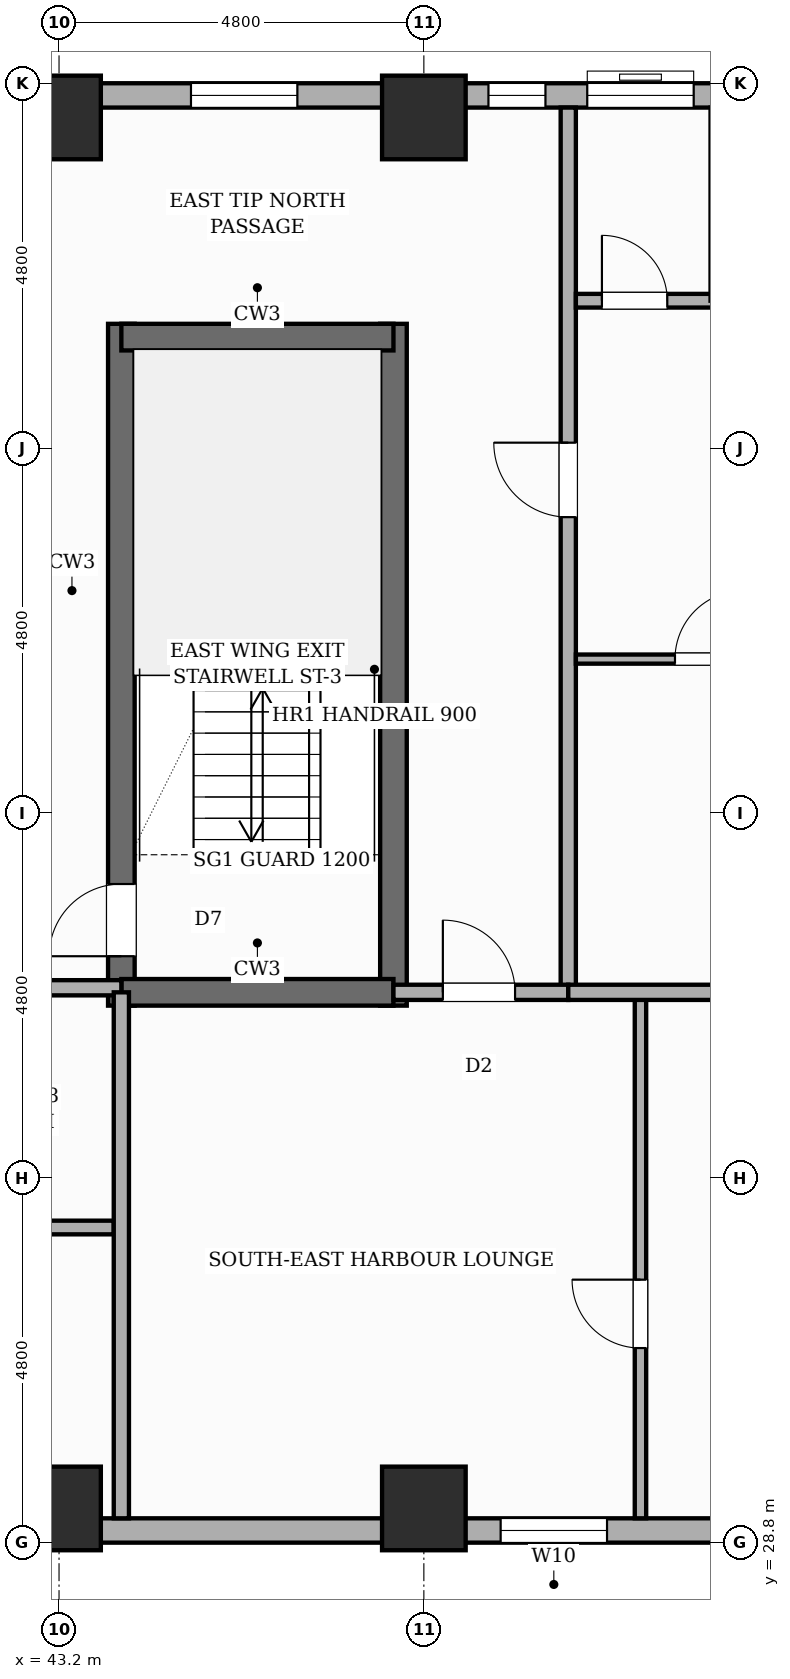
"""IFC4 building model, lengths in metres.
Left out: names, types, materials, properties, quantities, classifications, styles, units other than length and angle.
Written with IfcOpenShell. Run it as: python <this file> out.ifc"""

import sys

from ifc_helpers import new_model, si_unit, direction, frame, frame_2d, origin, origin_2d, place, context, subcontext, project, spatial, rectangle, extrude, element, fill, save


model = new_model("IFC4")
c1 = context("Model", 3, precision=1e-05, world=origin(), true_north=direction((0.0, 1.0)))
c2 = subcontext(c1, "Body", "Model", "MODEL_VIEW")
j1 = project(units=[si_unit("LENGTHUNIT", "METRE"), si_unit("PLANEANGLEUNIT", "RADIAN")], contexts=[c1])
p1 = place(None, origin())
s1 = spatial("IfcSite", under=j1, at=p1, CompositionType="ELEMENT")
p2 = place(p1, origin())
s2 = spatial("IfcBuilding", under=s1, at=p2, CompositionType="ELEMENT")
p3 = place(p2, frame((0.0, 0.0, 46.6)))
s3 = spatial("IfcBuildingStorey", under=s2, at=p3, CompositionType="ELEMENT", Elevation=46.6)
p4 = place(p3, frame((44.02, 35.865, 0.0), z_axis=(0.0, 0.0, 1.0), x_axis=(0.0, 1.0, 0.0)))
e1 = element("IfcWall", 1, at=p4, inside=s3, PredefinedType="SHEAR", context=c2, shape_type="SweptSolid", body=[
    extrude(rectangle(XDim=8.97, YDim=0.35, at=frame_2d((4.485, 0.0))), origin(), (0.0, 0.0, 1.0), 3.6),
])
p5 = place(p4, frame((0.65, 0.0, 0.0)))
e2 = element("IfcOpeningElement", 2, at=p5, cuts=e1, PredefinedType="OPENING", context=c2, shape_type="SweptSolid", body=[
    extrude(rectangle(XDim=0.95, YDim=2.1, at=frame_2d((0.475, 1.05))), frame((0.0, 0.185, 0.0), z_axis=(0.0, -1.0, 0.0), x_axis=(1.0, 0.0, 0.0)), (0.0, 0.0, 1.0), 0.37),
])
p6 = place(p3, frame((47.6, 35.865, 0.0), z_axis=(0.0, 0.0, 1.0), x_axis=(0.0, 1.0, 0.0)))
e3 = element("IfcWall", 3, at=p6, inside=s3, PredefinedType="SHEAR", context=c2, shape_type="SweptSolid", body=[
    extrude(rectangle(XDim=8.97, YDim=0.35, at=frame_2d((4.485, 0.0))), origin(), (0.0, 0.0, 1.0), 3.6),
])
for number, where, z_axis, x_axis in (
    (4, (44.02, 36.04, 0.0), (0.0, 0.0, 1.0), (1.0, 0.0, 0.0)),
    (5, (44.02, 44.66, 0.0), (0.0, 0.0, 1.0), (1.0, 0.0, 0.0)),
):
    element("IfcWall", number, at=place(p3, frame(where, z_axis=z_axis, x_axis=x_axis)), inside=s3, PredefinedType="SHEAR", context=c2, shape_type="SweptSolid", body=[
        extrude(rectangle(XDim=3.58, YDim=0.35, at=frame_2d((1.79, 0.0))), origin(), (0.0, 0.0, 1.0), 3.6),
    ])
for number, where, z_axis, x_axis in (
    (6, (43.2, 29.25, 0.0), (0.0, 0.0, 1.0), (1.0, 0.0, 0.0)),
    (7, (43.2, 47.55, 0.0), (0.0, 0.0, 1.0), (1.0, 0.0, 0.0)),
    (8, (48.0, 29.25, 0.0), (0.0, 0.0, 1.0), (1.0, 0.0, 0.0)),
    (9, (48.0, 47.55, 0.0), (0.0, 0.0, 1.0), (1.0, 0.0, 0.0)),
):
    element("IfcColumn", number, at=place(p3, frame(where, z_axis=z_axis, x_axis=x_axis)), inside=s3, PredefinedType="COLUMN", context=c2, shape_type="SweptSolid", body=[
        extrude(rectangle(XDim=1.1, YDim=1.1, at=origin_2d()), origin(), (0.0, 0.0, 1.0), 3.6),
    ])
p7 = place(p3, frame((7.2, 47.84, 0.0), z_axis=(0.0, 0.0, 1.0), x_axis=(1.0, 0.0, 0.0)))
e10 = element("IfcWall", 10, at=p7, inside=s3, PredefinedType="STANDARD", context=c2, shape_type="SweptSolid", body=[
    extrude(rectangle(XDim=48.0, YDim=0.32, at=frame_2d((24.0, 0.0))), origin(), (0.0, 0.0, 1.0), 2.53),
])
p8 = place(p7, frame((28.803, 0.0, 0.65)))
e11 = element("IfcOpeningElement", 11, at=p8, cuts=e10, PredefinedType="OPENING", context=c2, shape_type="SweptSolid", body=[
    extrude(rectangle(XDim=1.4, YDim=1.1, at=frame_2d((0.7, 0.55))), frame((0.0, 0.17, 0.0), z_axis=(0.0, -1.0, 0.0), x_axis=(1.0, 0.0, 0.0)), (0.0, 0.0, 1.0), 0.34),
])
p9 = place(p7, frame((47.094, 0.0, 0.45)))
e12 = element("IfcOpeningElement", 12, at=p9, cuts=e10, PredefinedType="OPENING", context=c2, shape_type="SweptSolid", body=[
    extrude(rectangle(XDim=0.6, YDim=1.8, at=frame_2d((0.3, 0.9))), frame((0.0, 0.17, 0.0), z_axis=(0.0, -1.0, 0.0), x_axis=(1.0, 0.0, 0.0)), (0.0, 0.0, 1.0), 0.34),
])
p10 = place(p7, frame((18.74, 0.0, 0.45)))
e13 = element("IfcOpeningElement", 13, at=p10, cuts=e10, PredefinedType="OPENING", context=c2, shape_type="SweptSolid", body=[
    extrude(rectangle(XDim=0.95, YDim=1.8, at=frame_2d((0.475, 0.9))), frame((0.0, 0.17, 0.0), z_axis=(0.0, -1.0, 0.0), x_axis=(1.0, 0.0, 0.0)), (0.0, 0.0, 1.0), 0.34),
])
p11 = place(p7, frame((41.65, 0.0, 0.45)))
e14 = element("IfcOpeningElement", 14, at=p11, cuts=e10, PredefinedType="OPENING", context=c2, shape_type="SweptSolid", body=[
    extrude(rectangle(XDim=0.75, YDim=1.8, at=frame_2d((0.375, 0.9))), frame((0.0, 0.17, 0.0), z_axis=(0.0, -1.0, 0.0), x_axis=(1.0, 0.0, 0.0)), (0.0, 0.0, 1.0), 0.34),
])
p12 = place(p7, frame((37.736, 0.0, 0.65)))
e15 = element("IfcOpeningElement", 15, at=p12, cuts=e10, PredefinedType="OPENING", context=c2, shape_type="SweptSolid", body=[
    extrude(rectangle(XDim=1.4, YDim=1.1, at=frame_2d((0.7, 0.55))), frame((0.0, 0.17, 0.0), z_axis=(0.0, -1.0, 0.0), x_axis=(1.0, 0.0, 0.0)), (0.0, 0.0, 1.0), 0.34),
])
p13 = place(p7, frame((0.47, 0.0, 0.45)))
e16 = element("IfcOpeningElement", 16, at=p13, cuts=e10, PredefinedType="OPENING", context=c2, shape_type="SweptSolid", body=[
    extrude(rectangle(XDim=0.95, YDim=1.8, at=frame_2d((0.475, 0.9))), frame((0.0, 0.17, 0.0), z_axis=(0.0, -1.0, 0.0), x_axis=(1.0, 0.0, 0.0)), (0.0, 0.0, 1.0), 0.34),
])
p14 = place(p7, frame((10.215, 0.0, 0.45)))
e17 = element("IfcOpeningElement", 17, at=p14, cuts=e10, PredefinedType="OPENING", context=c2, shape_type="SweptSolid", body=[
    extrude(rectangle(XDim=0.95, YDim=1.8, at=frame_2d((0.475, 0.9))), frame((0.0, 0.17, 0.0), z_axis=(0.0, -1.0, 0.0), x_axis=(1.0, 0.0, 0.0)), (0.0, 0.0, 1.0), 0.34),
])
p15 = place(p7, frame((23.43, 0.0, 0.65)))
e18 = element("IfcOpeningElement", 18, at=p15, cuts=e10, PredefinedType="OPENING", context=c2, shape_type="SweptSolid", body=[
    extrude(rectangle(XDim=1.4, YDim=1.1, at=frame_2d((0.7, 0.55))), frame((0.0, 0.17, 0.0), z_axis=(0.0, -1.0, 0.0), x_axis=(1.0, 0.0, 0.0)), (0.0, 0.0, 1.0), 0.34),
])
p16 = place(p7, frame((42.95, 0.0, 0.65)))
e19 = element("IfcOpeningElement", 19, at=p16, cuts=e10, PredefinedType="OPENING", context=c2, shape_type="SweptSolid", body=[
    extrude(rectangle(XDim=1.4, YDim=1.1, at=frame_2d((0.7, 0.55))), frame((0.0, 0.17, 0.0), z_axis=(0.0, -1.0, 0.0), x_axis=(1.0, 0.0, 0.0)), (0.0, 0.0, 1.0), 0.34),
])
p17 = place(p7, frame((45.984, 0.0, 0.45)))
e20 = element("IfcOpeningElement", 20, at=p17, cuts=e10, PredefinedType="OPENING", context=c2, shape_type="SweptSolid", body=[
    extrude(rectangle(XDim=0.6, YDim=1.8, at=frame_2d((0.3, 0.9))), frame((0.0, 0.17, 0.0), z_axis=(0.0, -1.0, 0.0), x_axis=(1.0, 0.0, 0.0)), (0.0, 0.0, 1.0), 0.34),
])
p18 = place(p3, frame((55.2, 28.96, 0.0), z_axis=(0.0, 0.0, 1.0), x_axis=(-1.0, 0.0, 0.0)))
e21 = element("IfcWall", 21, at=p18, inside=s3, PredefinedType="STANDARD", context=c2, shape_type="SweptSolid", body=[
    extrude(rectangle(XDim=28.8, YDim=0.32, at=frame_2d((14.4, 0.0))), origin(), (0.0, 0.0, 1.0), 2.53),
])
p19 = place(p18, frame((27.38, 0.0, 0.45)))
e22 = element("IfcOpeningElement", 22, at=p19, cuts=e21, PredefinedType="OPENING", context=c2, shape_type="SweptSolid", body=[
    extrude(rectangle(XDim=0.95, YDim=1.8, at=frame_2d((0.475, 0.9))), frame((0.0, 0.17, 0.0), z_axis=(0.0, -1.0, 0.0), x_axis=(1.0, 0.0, 0.0)), (0.0, 0.0, 1.0), 0.34),
])
p20 = place(p18, frame((18.815, 0.0, 0.65)))
e23 = element("IfcOpeningElement", 23, at=p20, cuts=e21, PredefinedType="OPENING", context=c2, shape_type="SweptSolid", body=[
    extrude(rectangle(XDim=1.4, YDim=1.1, at=frame_2d((0.7, 0.55))), frame((0.0, 0.17, 0.0), z_axis=(0.0, -1.0, 0.0), x_axis=(1.0, 0.0, 0.0)), (0.0, 0.0, 1.0), 0.34),
])
p21 = place(p18, frame((14.604, 0.0, 0.65)))
e24 = element("IfcOpeningElement", 24, at=p21, cuts=e21, PredefinedType="OPENING", context=c2, shape_type="SweptSolid", body=[
    extrude(rectangle(XDim=1.4, YDim=1.1, at=frame_2d((0.7, 0.55))), frame((0.0, 0.17, 0.0), z_axis=(0.0, -1.0, 0.0), x_axis=(1.0, 0.0, 0.0)), (0.0, 0.0, 1.0), 0.34),
])
p22 = place(p18, frame((4.79, 0.0, 0.65)))
e25 = element("IfcOpeningElement", 25, at=p22, cuts=e21, PredefinedType="OPENING", context=c2, shape_type="SweptSolid", body=[
    extrude(rectangle(XDim=1.4, YDim=1.1, at=frame_2d((0.7, 0.55))), frame((0.0, 0.17, 0.0), z_axis=(0.0, -1.0, 0.0), x_axis=(1.0, 0.0, 0.0)), (0.0, 0.0, 1.0), 0.34),
])
p23 = place(p18, frame((0.47, 0.0, 0.65)))
e26 = element("IfcOpeningElement", 26, at=p23, cuts=e21, PredefinedType="OPENING", context=c2, shape_type="SweptSolid", body=[
    extrude(rectangle(XDim=1.4, YDim=1.1, at=frame_2d((0.7, 0.55))), frame((0.0, 0.17, 0.0), z_axis=(0.0, -1.0, 0.0), x_axis=(1.0, 0.0, 0.0)), (0.0, 0.0, 1.0), 0.34),
])
p24 = place(p18, frame((23.76, 0.0, 0.65)))
e27 = element("IfcOpeningElement", 27, at=p24, cuts=e21, PredefinedType="OPENING", context=c2, shape_type="SweptSolid", body=[
    extrude(rectangle(XDim=1.4, YDim=1.1, at=frame_2d((0.7, 0.55))), frame((0.0, 0.17, 0.0), z_axis=(0.0, -1.0, 0.0), x_axis=(1.0, 0.0, 0.0)), (0.0, 0.0, 1.0), 0.34),
])
p25 = place(p18, frame((12.999, 0.0, 0.45)))
e28 = element("IfcOpeningElement", 28, at=p25, cuts=e21, PredefinedType="OPENING", context=c2, shape_type="SweptSolid", body=[
    extrude(rectangle(XDim=0.95, YDim=1.8, at=frame_2d((0.475, 0.9))), frame((0.0, 0.17, 0.0), z_axis=(0.0, -1.0, 0.0), x_axis=(1.0, 0.0, 0.0)), (0.0, 0.0, 1.0), 0.34),
])
p26 = place(p3, frame((22.75, 36.1, 0.0), z_axis=(0.0, 0.0, 1.0), x_axis=(1.0, 0.0, 0.0)))
e29 = element("IfcWall", 29, at=p26, inside=s3, PredefinedType="PARTITIONING", context=c2, shape_type="SweptSolid", body=[
    extrude(rectangle(XDim=21.27, YDim=0.2, at=frame_2d((10.635, 0.0))), origin(), (0.0, 0.0, 1.0), 3.35),
])
p27 = place(p26, frame((1.271, 0.0, 0.0)))
e30 = element("IfcOpeningElement", 30, at=p27, cuts=e29, PredefinedType="OPENING", context=c2, shape_type="SweptSolid", body=[
    extrude(rectangle(XDim=0.98, YDim=2.18, at=frame_2d((0.49, 1.09))), frame((0.0, 0.11, 0.0), z_axis=(0.0, -1.0, 0.0), x_axis=(1.0, 0.0, 0.0)), (0.0, 0.0, 1.0), 0.22),
])
p28 = place(p26, frame((7.54, 0.0, 0.0)))
e31 = element("IfcOpeningElement", 31, at=p28, cuts=e29, PredefinedType="OPENING", context=c2, shape_type="SweptSolid", body=[
    extrude(rectangle(XDim=0.98, YDim=2.18, at=frame_2d((0.49, 1.09))), frame((0.0, 0.11, 0.0), z_axis=(0.0, -1.0, 0.0), x_axis=(1.0, 0.0, 0.0)), (0.0, 0.0, 1.0), 0.22),
])
p29 = place(p26, frame((15.615, 0.0, 0.0)))
e32 = element("IfcOpeningElement", 32, at=p29, cuts=e29, PredefinedType="OPENING", context=c2, shape_type="SweptSolid", body=[
    extrude(rectangle(XDim=0.98, YDim=2.18, at=frame_2d((0.49, 1.09))), frame((0.0, 0.11, 0.0), z_axis=(0.0, -1.0, 0.0), x_axis=(1.0, 0.0, 0.0)), (0.0, 0.0, 1.0), 0.22),
])
p30 = place(p3, frame((40.822, 32.946, 0.0), z_axis=(0.0, 0.0, 1.0), x_axis=(1.0, 0.0, 0.0)))
e33 = element("IfcWall", 33, at=p30, inside=s3, PredefinedType="PLUMBINGWALL", context=c2, shape_type="SweptSolid", body=[
    extrude(rectangle(XDim=3.098, YDim=0.18, at=frame_2d((1.549, 0.0))), origin(), (0.0, 0.0, 1.0), 3.35),
])
p31 = place(p3, frame((49.9, 36.04, 0.0), z_axis=(0.0, 0.0, 1.0), x_axis=(0.0, 1.0, 0.0)))
e34 = element("IfcWall", 34, at=p31, inside=s3, PredefinedType="PARTITIONING", context=c2, shape_type="SweptSolid", body=[
    extrude(rectangle(XDim=11.64, YDim=0.2, at=frame_2d((5.82, 0.0))), origin(), (0.0, 0.0, 1.0), 3.35),
])
p32 = place(p31, frame((6.251, 0.0, 0.0)))
e35 = element("IfcOpeningElement", 35, at=p32, cuts=e34, PredefinedType="OPENING", context=c2, shape_type="SweptSolid", body=[
    extrude(rectangle(XDim=0.98, YDim=2.18, at=frame_2d((0.49, 1.09))), frame((0.0, 0.11, 0.0), z_axis=(0.0, -1.0, 0.0), x_axis=(1.0, 0.0, 0.0)), (0.0, 0.0, 1.0), 0.22),
])
p33 = place(p3, frame((47.6, 36.04, 0.0), z_axis=(0.0, 0.0, 1.0), x_axis=(1.0, 0.0, 0.0)))
e36 = element("IfcWall", 36, at=p33, inside=s3, PredefinedType="PARTITIONING", context=c2, shape_type="SweptSolid", body=[
    extrude(rectangle(XDim=2.3, YDim=0.2, at=frame_2d((1.15, 0.0))), origin(), (0.0, 0.0, 1.0), 3.35),
])
p34 = place(p33, frame((0.65, 0.0, 0.0)))
e37 = element("IfcOpeningElement", 37, at=p34, cuts=e36, PredefinedType="OPENING", context=c2, shape_type="SweptSolid", body=[
    extrude(rectangle(XDim=0.95, YDim=2.15, at=frame_2d((0.475, 1.075))), frame((0.0, 0.11, 0.0), z_axis=(0.0, -1.0, 0.0), x_axis=(1.0, 0.0, 0.0)), (0.0, 0.0, 1.0), 0.22),
])
p35 = place(p3, frame((44.02, 29.12, 0.0), z_axis=(0.0, 0.0, 1.0), x_axis=(0.0, 1.0, 0.0)))
e38 = element("IfcWall", 38, at=p35, inside=s3, PredefinedType="SOLIDWALL", context=c2, shape_type="SweptSolid", body=[
    extrude(rectangle(XDim=6.92, YDim=0.2, at=frame_2d((3.46, 0.0))), origin(), (0.0, 0.0, 1.0), 3.35),
])
p36 = place(p3, frame((50.85, 29.12, 0.0), z_axis=(0.0, 0.0, 1.0), x_axis=(0.0, 1.0, 0.0)))
e39 = element("IfcWall", 39, at=p36, inside=s3, PredefinedType="PARTITIONING", context=c2, shape_type="SweptSolid", body=[
    extrude(rectangle(XDim=6.92, YDim=0.15, at=frame_2d((3.46, 0.0))), origin(), (0.0, 0.0, 1.0), 3.35),
])
p37 = place(p36, frame((2.24, 0.0, 0.0)))
e40 = element("IfcOpeningElement", 40, at=p37, cuts=e39, PredefinedType="OPENING", context=c2, shape_type="SweptSolid", body=[
    extrude(rectangle(XDim=0.9, YDim=2.15, at=frame_2d((0.45, 1.075))), frame((0.0, 0.085, 0.0), z_axis=(0.0, -1.0, 0.0), x_axis=(1.0, 0.0, 0.0)), (0.0, 0.0, 1.0), 0.17),
])
p38 = place(p3, frame((49.9, 36.04, 0.0), z_axis=(0.0, 0.0, 1.0), x_axis=(1.0, 0.0, 0.0)))
e41 = element("IfcWall", 41, at=p38, inside=s3, PredefinedType="SOLIDWALL", context=c2, shape_type="SweptSolid", body=[
    extrude(rectangle(XDim=7.38, YDim=0.2, at=frame_2d((3.69, 0.0))), origin(), (0.0, 0.0, 1.0), 3.35),
])
p39 = place(p3, frame((50.0, 45.139, 0.0), z_axis=(0.0, 0.0, 1.0), x_axis=(1.0, 0.0, 0.0)))
e42 = element("IfcWall", 42, at=p39, inside=s3, PredefinedType="PLUMBINGWALL", context=c2, shape_type="SweptSolid", body=[
    extrude(rectangle(XDim=7.28, YDim=0.18, at=frame_2d((3.64, 0.0))), origin(), (0.0, 0.0, 1.0), 3.35),
])
p40 = place(p39, frame((0.343, 0.0, 0.0)))
e43 = element("IfcOpeningElement", 43, at=p40, cuts=e42, PredefinedType="OPENING", context=c2, shape_type="SweptSolid", body=[
    extrude(rectangle(XDim=0.86, YDim=2.1, at=frame_2d((0.43, 1.05))), frame((0.0, 0.1, 0.0), z_axis=(0.0, -1.0, 0.0), x_axis=(1.0, 0.0, 0.0)), (0.0, 0.0, 1.0), 0.2),
])
p41 = place(p39, frame((2.328, 0.0, 0.0)))
e44 = element("IfcOpeningElement", 44, at=p41, cuts=e42, PredefinedType="OPENING", context=c2, shape_type="SweptSolid", body=[
    extrude(rectangle(XDim=0.9, YDim=2.15, at=frame_2d((0.45, 1.075))), frame((0.0, 0.1, 0.0), z_axis=(0.0, -1.0, 0.0), x_axis=(1.0, 0.0, 0.0)), (0.0, 0.0, 1.0), 0.2),
])
p42 = place(p39, frame((5.057, 0.0, 0.0)))
e45 = element("IfcOpeningElement", 45, at=p42, cuts=e42, PredefinedType="OPENING", context=c2, shape_type="SweptSolid", body=[
    extrude(rectangle(XDim=0.9, YDim=2.15, at=frame_2d((0.45, 1.075))), frame((0.0, 0.1, 0.0), z_axis=(0.0, -1.0, 0.0), x_axis=(1.0, 0.0, 0.0)), (0.0, 0.0, 1.0), 0.2),
])
p43 = place(p3, frame((50.0, 40.424, 0.0), z_axis=(0.0, 0.0, 1.0), x_axis=(1.0, 0.0, 0.0)))
e46 = element("IfcWall", 46, at=p43, inside=s3, PredefinedType="PARTITIONING", context=c2, shape_type="SweptSolid", body=[
    extrude(rectangle(XDim=7.28, YDim=0.12, at=frame_2d((3.64, 0.0))), origin(), (0.0, 0.0, 1.0), 3.35),
])
p44 = place(p43, frame((1.304, 0.0, 0.0)))
e47 = element("IfcOpeningElement", 47, at=p44, cuts=e46, PredefinedType="OPENING", context=c2, shape_type="SweptSolid", body=[
    extrude(rectangle(XDim=0.9, YDim=2.15, at=frame_2d((0.45, 1.075))), frame((0.0, 0.07, 0.0), z_axis=(0.0, -1.0, 0.0), x_axis=(1.0, 0.0, 0.0)), (0.0, 0.0, 1.0), 0.14),
])
p45 = place(p43, frame((5.057, 0.0, 0.0)))
e48 = element("IfcOpeningElement", 48, at=p45, cuts=e46, PredefinedType="OPENING", context=c2, shape_type="SweptSolid", body=[
    extrude(rectangle(XDim=0.9, YDim=2.15, at=frame_2d((0.45, 1.075))), frame((0.0, 0.07, 0.0), z_axis=(0.0, -1.0, 0.0), x_axis=(1.0, 0.0, 0.0)), (0.0, 0.0, 1.0), 0.14),
])
p46 = place(p11, origin())
e49 = element("IfcWindow", 49, at=p46, inside=s3, PartitioningType="SINGLE_PANEL", PredefinedType="WINDOW", context=c2, shape_type="SweptSolid", body=[
    extrude(rectangle(XDim=0.75, YDim=1.8, at=frame_2d((0.375, 0.9))), frame((0.0, 0.03, 0.0), z_axis=(0.0, -1.0, 0.0), x_axis=(1.0, 0.0, 0.0)), (0.0, 0.0, 1.0), 0.06),
])
fill(e14, e49)
p47 = place(p12, origin())
e50 = element("IfcWindow", 50, at=p47, inside=s3, PartitioningType="SINGLE_PANEL", PredefinedType="WINDOW", context=c2, shape_type="SweptSolid", body=[
    extrude(rectangle(XDim=1.4, YDim=1.1, at=frame_2d((0.7, 0.55))), frame((0.0, 0.03, 0.0), z_axis=(0.0, -1.0, 0.0), x_axis=(1.0, 0.0, 0.0)), (0.0, 0.0, 1.0), 0.06),
])
fill(e15, e50)
p48 = place(p16, origin())
e51 = element("IfcWindow", 51, at=p48, inside=s3, PartitioningType="SINGLE_PANEL", PredefinedType="WINDOW", context=c2, shape_type="SweptSolid", body=[
    extrude(rectangle(XDim=1.4, YDim=1.1, at=frame_2d((0.7, 0.55))), frame((0.0, 0.03, 0.0), z_axis=(0.0, -1.0, 0.0), x_axis=(1.0, 0.0, 0.0)), (0.0, 0.0, 1.0), 0.06),
])
fill(e19, e51)
p49 = place(p22, origin())
e52 = element("IfcWindow", 52, at=p49, inside=s3, PartitioningType="SINGLE_PANEL", PredefinedType="WINDOW", context=c2, shape_type="SweptSolid", body=[
    extrude(rectangle(XDim=1.4, YDim=1.1, at=frame_2d((0.7, 0.55))), frame((0.0, 0.03, 0.0), z_axis=(0.0, -1.0, 0.0), x_axis=(1.0, 0.0, 0.0)), (0.0, 0.0, 1.0), 0.06),
])
fill(e25, e52)
p50 = place(p5, origin())
e53 = element("IfcDoor", 53, at=p50, inside=s3, OperationType="SINGLE_SWING_LEFT", PredefinedType="DOOR", context=c2, shape_type="SweptSolid", body=[
    extrude(rectangle(XDim=0.95, YDim=2.1, at=frame_2d((0.475, 1.05))), frame((0.0, 0.025, 0.0), z_axis=(0.0, -1.0, 0.0), x_axis=(1.0, 0.0, 0.0)), (0.0, 0.0, 1.0), 0.05),
])
fill(e2, e53)
p51 = place(p34, origin())
e54 = element("IfcDoor", 54, at=p51, inside=s3, OperationType="SINGLE_SWING_LEFT", PredefinedType="DOOR", context=c2, shape_type="SweptSolid", body=[
    extrude(rectangle(XDim=0.95, YDim=2.15, at=frame_2d((0.475, 1.075))), frame((0.0, 0.025, 0.0), z_axis=(0.0, -1.0, 0.0), x_axis=(1.0, 0.0, 0.0)), (0.0, 0.0, 1.0), 0.05),
])
fill(e37, e54)
p52 = place(p37, origin())
e55 = element("IfcDoor", 55, at=p52, inside=s3, OperationType="SINGLE_SWING_RIGHT", PredefinedType="DOOR", context=c2, shape_type="SweptSolid", body=[
    extrude(rectangle(XDim=0.9, YDim=2.15, at=frame_2d((0.45, 1.075))), frame((0.0, 0.025, 0.0), z_axis=(0.0, -1.0, 0.0), x_axis=(1.0, 0.0, 0.0)), (0.0, 0.0, 1.0), 0.05),
])
fill(e40, e55)
p53 = place(p32, origin())
e56 = element("IfcDoor", 56, at=p53, inside=s3, OperationType="SINGLE_SWING_RIGHT", PredefinedType="DOOR", context=c2, shape_type="SweptSolid", body=[
    extrude(rectangle(XDim=0.98, YDim=2.18, at=frame_2d((0.49, 1.09))), frame((0.0, 0.025, 0.0), z_axis=(0.0, -1.0, 0.0), x_axis=(1.0, 0.0, 0.0)), (0.0, 0.0, 1.0), 0.05),
])
fill(e35, e56)
p54 = place(p44, origin())
e57 = element("IfcDoor", 57, at=p54, inside=s3, OperationType="SINGLE_SWING_RIGHT", PredefinedType="DOOR", context=c2, shape_type="SweptSolid", body=[
    extrude(rectangle(XDim=0.9, YDim=2.15, at=frame_2d((0.45, 1.075))), frame((0.0, 0.025, 0.0), z_axis=(0.0, -1.0, 0.0), x_axis=(1.0, 0.0, 0.0)), (0.0, 0.0, 1.0), 0.05),
])
fill(e47, e57)
p55 = place(p40, origin())
e58 = element("IfcDoor", 58, at=p55, inside=s3, OperationType="SINGLE_SWING_LEFT", PredefinedType="DOOR", context=c2, shape_type="SweptSolid", body=[
    extrude(rectangle(XDim=0.86, YDim=2.1, at=frame_2d((0.43, 1.05))), frame((0.0, 0.025, 0.0), z_axis=(0.0, -1.0, 0.0), x_axis=(1.0, 0.0, 0.0)), (0.0, 0.0, 1.0), 0.05),
])
fill(e43, e58)
save(model, sys.argv[1])
